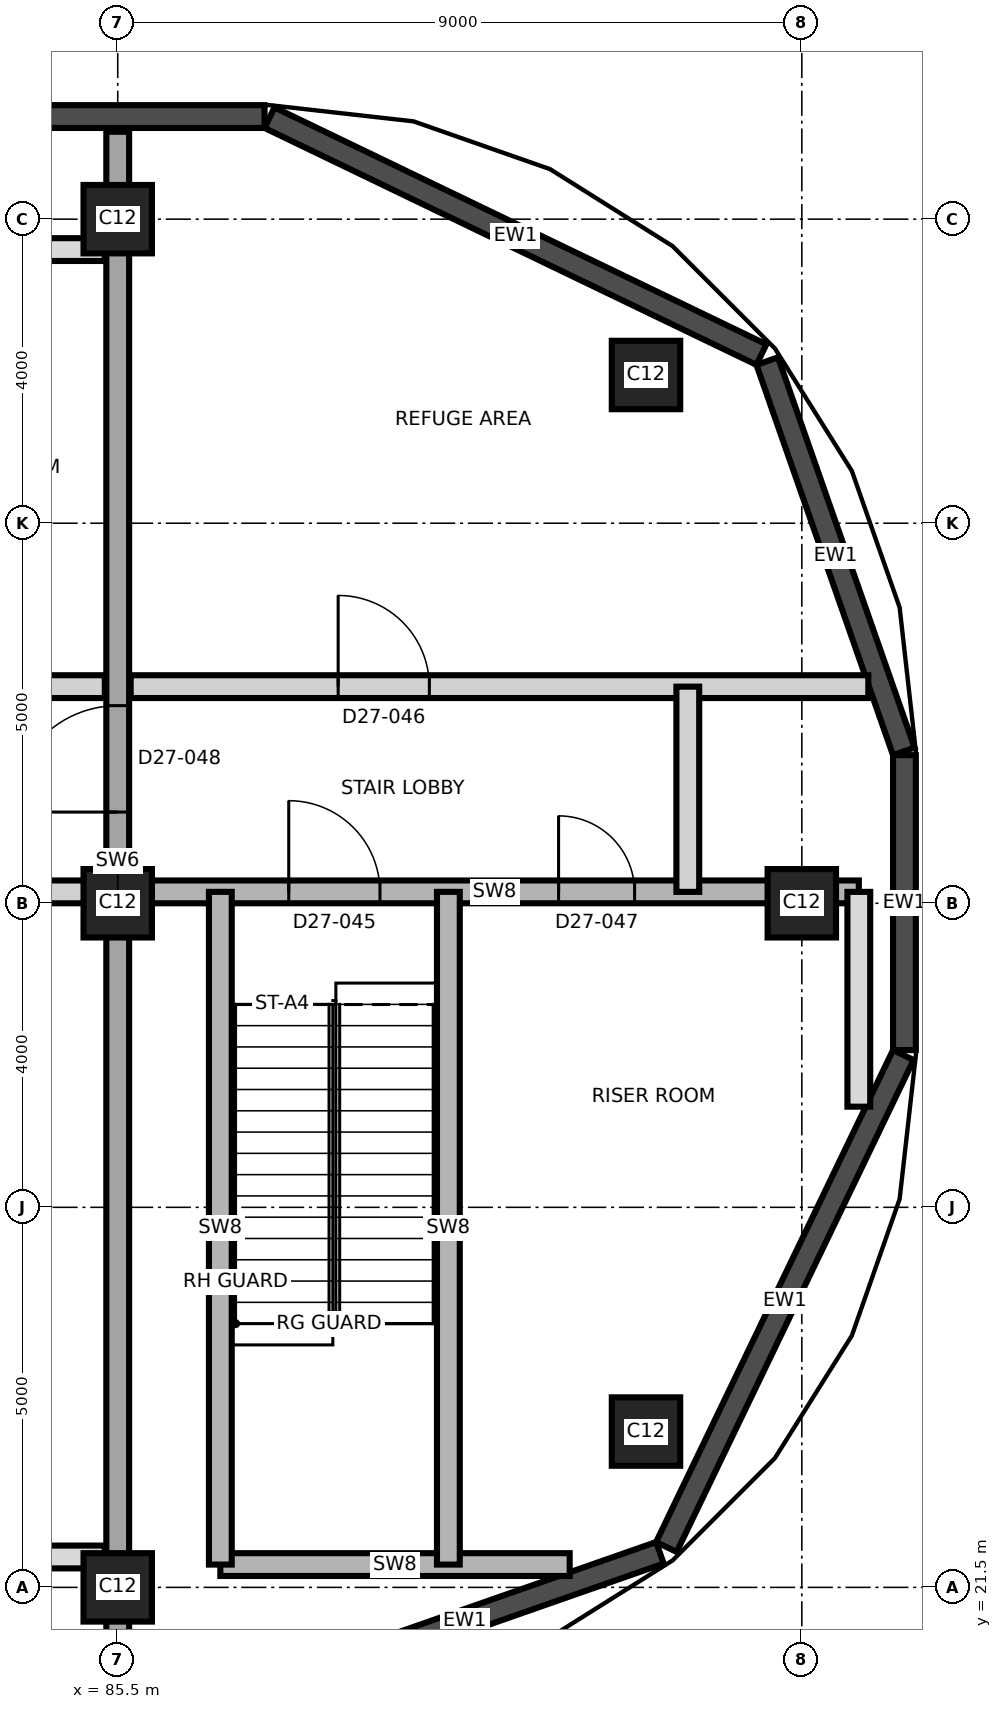
"""IFC4 building model, lengths in metres.
Left out: names, types, materials, properties, quantities, classifications, styles, units other than length and angle.
Written with IfcOpenShell. Run it as: python <this file> out.ifc"""

import sys

from ifc_helpers import new_model, si_unit, direction, frame, frame_2d, origin, origin_2d, place, context, subcontext, project, spatial, rectangle, extrude, element, fill, save


model = new_model("IFC4")
c1 = context("Model", 3, precision=1e-05, world=origin(), true_north=direction((0.0, 1.0)))
c2 = subcontext(c1, "Body", "Model", "MODEL_VIEW")
j1 = project(units=[si_unit("LENGTHUNIT", "METRE"), si_unit("PLANEANGLEUNIT", "RADIAN")], contexts=[c1])
p1 = place(None, origin())
s1 = spatial("IfcSite", under=j1, at=p1, CompositionType="ELEMENT")
p2 = place(p1, origin())
s2 = spatial("IfcBuilding", under=s1, at=p2, CompositionType="ELEMENT")
p3 = place(p2, frame((0.0, 0.0, 243.9)))
s3 = spatial("IfcBuildingStorey", under=s2, at=p3, CompositionType="ELEMENT", Elevation=243.9)
for number, where, z_axis, x_axis in (
    (1, (85.5, 21.5, 0.0), (0.0, 0.0, 1.0), (1.0, 0.0, 0.0)),
    (2, (92.45, 23.55, 0.0), (0.0, 0.0, 1.0), (1.0, 0.0, 0.0)),
    (3, (85.5, 30.5, 0.0), (0.0, 0.0, 1.0), (1.0, 0.0, 0.0)),
    (4, (94.5, 30.5, 0.0), (0.0, 0.0, 1.0), (1.0, 0.0, 0.0)),
    (5, (92.45, 37.45, 0.0), (0.0, 0.0, 1.0), (1.0, 0.0, 0.0)),
    (6, (85.5, 39.5, 0.0), (0.0, 0.0, 1.0), (1.0, 0.0, 0.0)),
):
    element("IfcColumn", number, at=place(p3, frame(where, z_axis=z_axis, x_axis=x_axis)), inside=s3, PredefinedType="COLUMN", context=c2, shape_type="SweptSolid", body=[
        extrude(rectangle(XDim=0.9, YDim=0.9, at=origin_2d()), origin(), (0.0, 0.0, 1.0), 5.5),
    ])
p4 = place(p3, frame((85.5, 20.35, 0.0), z_axis=(0.0, 0.0, 1.0), x_axis=(0.0, 1.0, 0.0)))
e7 = element("IfcWall", 7, at=p4, inside=s3, PredefinedType="SHEAR", context=c2, shape_type="SweptSolid", body=[
    extrude(rectangle(XDim=20.3, YDim=0.3, at=frame_2d((10.15, 0.0))), origin(), (0.0, 0.0, 1.0), 5.5),
])
p5 = place(p4, frame((11.35, 0.0, 0.0)))
e8 = element("IfcOpeningElement", 8, at=p5, cuts=e7, PredefinedType="OPENING", context=c2, shape_type="SweptSolid", body=[
    extrude(rectangle(XDim=1.4, YDim=2.1, at=frame_2d((0.7, 1.05))), frame((0.0, 0.16, 0.0), z_axis=(0.0, -1.0, 0.0), x_axis=(1.0, 0.0, 0.0)), (0.0, 0.0, 1.0), 0.32),
])
p6 = place(p3, frame((87.499, 20.158, 0.0), z_axis=(0.0, 0.0, 1.0), x_axis=(0.943879346284, 0.330290447423, 0.0)))
e9 = element("IfcWall", 9, at=p6, inside=s3, PredefinedType="SOLIDWALL", context=c2, shape_type="SweptSolid", body=[
    extrude(rectangle(XDim=5.439, YDim=0.3, at=frame_2d((2.72, 0.0))), origin(), (0.0, 0.0, 1.0), 5.2),
])
p7 = place(p3, frame((92.719, 22.031, 0.0), z_axis=(0.0, 0.0, 1.0), x_axis=(0.433882040461, 0.90096968593, 0.0)))
e10 = element("IfcWall", 10, at=p7, inside=s3, PredefinedType="SOLIDWALL", context=c2, shape_type="SweptSolid", body=[
    extrude(rectangle(XDim=7.183, YDim=0.3, at=frame_2d((3.592, 0.0))), origin(), (0.0, 0.0, 1.0), 5.2),
])
p8 = place(p3, frame((95.85, 28.568, 0.0), z_axis=(0.0, 0.0, 1.0), x_axis=(0.0, 1.0, 0.0)))
e11 = element("IfcWall", 11, at=p8, inside=s3, PredefinedType="SOLIDWALL", context=c2, shape_type="SweptSolid", body=[
    extrude(rectangle(XDim=3.881, YDim=0.3, at=frame_2d((1.94, 0.0))), origin(), (0.0, 0.0, 1.0), 5.2),
])
p9 = place(p3, frame((95.842, 32.499, 0.0), z_axis=(0.0, 0.0, 1.0), x_axis=(-0.330290447423, 0.943879346284, 0.0)))
e12 = element("IfcWall", 12, at=p9, inside=s3, PredefinedType="SOLIDWALL", context=c2, shape_type="SweptSolid", body=[
    extrude(rectangle(XDim=5.439, YDim=0.3, at=frame_2d((2.72, 0.0))), origin(), (0.0, 0.0, 1.0), 5.2),
])
p10 = place(p3, frame((93.969, 37.719, 0.0), z_axis=(0.0, 0.0, 1.0), x_axis=(-0.90096968593, 0.433882040461, 0.0)))
e13 = element("IfcWall", 13, at=p10, inside=s3, PredefinedType="SOLIDWALL", context=c2, shape_type="SweptSolid", body=[
    extrude(rectangle(XDim=7.183, YDim=0.3, at=frame_2d((3.592, 0.0))), origin(), (0.0, 0.0, 1.0), 5.2),
])
p11 = place(p3, frame((87.432, 40.85, 0.0), z_axis=(0.0, 0.0, 1.0), x_axis=(-1.0, 0.0, 0.0)))
e14 = element("IfcWall", 14, at=p11, inside=s3, PredefinedType="SOLIDWALL", context=c2, shape_type="SweptSolid", body=[
    extrude(rectangle(XDim=31.932, YDim=0.3, at=frame_2d((15.966, 0.0))), origin(), (0.0, 0.0, 1.0), 5.2),
])
p12 = place(p3, frame((86.85, 21.8, 0.0), z_axis=(0.0, 0.0, 1.0), x_axis=(1.0, 0.0, 0.0)))
e15 = element("IfcWall", 15, at=p12, inside=s3, PredefinedType="SHEAR", context=c2, shape_type="SweptSolid", body=[
    extrude(rectangle(XDim=4.596, YDim=0.3, at=frame_2d((2.298, 0.0))), origin(), (0.0, 0.0, 1.0), 5.2),
])
p13 = place(p3, frame((58.55, 21.9, 0.0), z_axis=(0.0, 0.0, 1.0), x_axis=(1.0, 0.0, 0.0)))
e16 = element("IfcWall", 16, at=p13, inside=s3, PredefinedType="PARTITIONING", context=c2, shape_type="SweptSolid", body=[
    extrude(rectangle(XDim=26.78, YDim=0.3, at=frame_2d((13.39, 0.0))), origin(), (0.0, 0.0, 1.0), 5.2),
])
p14 = place(p3, frame((58.55, 30.65, 0.0), z_axis=(0.0, 0.0, 1.0), x_axis=(1.0, 0.0, 0.0)))
e17 = element("IfcWall", 17, at=p14, inside=s3, PredefinedType="PARTITIONING", context=c2, shape_type="SweptSolid", body=[
    extrude(rectangle(XDim=26.78, YDim=0.3, at=frame_2d((13.39, 0.0))), origin(), (0.0, 0.0, 1.0), 5.2),
])
p15 = place(p14, frame((1.6, 0.0, 0.0)))
e18 = element("IfcOpeningElement", 18, at=p15, cuts=e17, PredefinedType="OPENING", context=c2, shape_type="SweptSolid", body=[
    extrude(rectangle(XDim=1.2, YDim=2.1, at=frame_2d((0.6, 1.05))), frame((0.0, 0.16, 0.0), z_axis=(0.0, -1.0, 0.0), x_axis=(1.0, 0.0, 0.0)), (0.0, 0.0, 1.0), 0.32),
])
p16 = place(p14, frame((6.1, 0.0, 0.0)))
e19 = element("IfcOpeningElement", 19, at=p16, cuts=e17, PredefinedType="OPENING", context=c2, shape_type="SweptSolid", body=[
    extrude(rectangle(XDim=1.2, YDim=2.1, at=frame_2d((0.6, 1.05))), frame((0.0, 0.16, 0.0), z_axis=(0.0, -1.0, 0.0), x_axis=(1.0, 0.0, 0.0)), (0.0, 0.0, 1.0), 0.32),
])
p17 = place(p14, frame((10.6, 0.0, 0.0)))
e20 = element("IfcOpeningElement", 20, at=p17, cuts=e17, PredefinedType="OPENING", context=c2, shape_type="SweptSolid", body=[
    extrude(rectangle(XDim=1.2, YDim=2.1, at=frame_2d((0.6, 1.05))), frame((0.0, 0.16, 0.0), z_axis=(0.0, -1.0, 0.0), x_axis=(1.0, 0.0, 0.0)), (0.0, 0.0, 1.0), 0.32),
])
p18 = place(p14, frame((15.1, 0.0, 0.0)))
e21 = element("IfcOpeningElement", 21, at=p18, cuts=e17, PredefinedType="OPENING", context=c2, shape_type="SweptSolid", body=[
    extrude(rectangle(XDim=1.2, YDim=2.1, at=frame_2d((0.6, 1.05))), frame((0.0, 0.16, 0.0), z_axis=(0.0, -1.0, 0.0), x_axis=(1.0, 0.0, 0.0)), (0.0, 0.0, 1.0), 0.32),
])
p19 = place(p14, frame((19.6, 0.0, 0.0)))
e22 = element("IfcOpeningElement", 22, at=p19, cuts=e17, PredefinedType="OPENING", context=c2, shape_type="SweptSolid", body=[
    extrude(rectangle(XDim=1.2, YDim=2.1, at=frame_2d((0.6, 1.05))), frame((0.0, 0.16, 0.0), z_axis=(0.0, -1.0, 0.0), x_axis=(1.0, 0.0, 0.0)), (0.0, 0.0, 1.0), 0.32),
])
p20 = place(p14, frame((24.1, 0.0, 0.0)))
e23 = element("IfcOpeningElement", 23, at=p20, cuts=e17, PredefinedType="OPENING", context=c2, shape_type="SweptSolid", body=[
    extrude(rectangle(XDim=1.2, YDim=2.1, at=frame_2d((0.6, 1.05))), frame((0.0, 0.16, 0.0), z_axis=(0.0, -1.0, 0.0), x_axis=(1.0, 0.0, 0.0)), (0.0, 0.0, 1.0), 0.32),
])
p21 = place(p3, frame((85.67, 30.65, 0.0), z_axis=(0.0, 0.0, 1.0), x_axis=(1.0, 0.0, 0.0)))
e24 = element("IfcWall", 24, at=p21, inside=s3, PredefinedType="SHEAR", context=c2, shape_type="SweptSolid", body=[
    extrude(rectangle(XDim=9.58, YDim=0.3, at=frame_2d((4.79, 0.0))), origin(), (0.0, 0.0, 1.0), 5.2),
])
p22 = place(p21, frame((2.08, 0.0, 0.0)))
e25 = element("IfcOpeningElement", 25, at=p22, cuts=e24, PredefinedType="OPENING", context=c2, shape_type="SweptSolid", body=[
    extrude(rectangle(XDim=1.2, YDim=2.1, at=frame_2d((0.6, 1.05))), frame((0.0, 0.16, 0.0), z_axis=(0.0, -1.0, 0.0), x_axis=(1.0, 0.0, 0.0)), (0.0, 0.0, 1.0), 0.32),
])
p23 = place(p21, frame((5.63, 0.0, 0.0)))
e26 = element("IfcOpeningElement", 26, at=p23, cuts=e24, PredefinedType="OPENING", context=c2, shape_type="SweptSolid", body=[
    extrude(rectangle(XDim=1.0, YDim=2.1, at=frame_2d((0.5, 1.05))), frame((0.0, 0.16, 0.0), z_axis=(0.0, -1.0, 0.0), x_axis=(1.0, 0.0, 0.0)), (0.0, 0.0, 1.0), 0.32),
])
p24 = place(p3, frame((58.55, 33.35, 0.0), z_axis=(0.0, 0.0, 1.0), x_axis=(1.0, 0.0, 0.0)))
e27 = element("IfcWall", 27, at=p24, inside=s3, PredefinedType="PARTITIONING", context=c2, shape_type="SweptSolid", body=[
    extrude(rectangle(XDim=26.78, YDim=0.3, at=frame_2d((13.39, 0.0))), origin(), (0.0, 0.0, 1.0), 5.2),
])
p25 = place(p24, frame((1.6, 0.0, 0.0)))
e28 = element("IfcOpeningElement", 28, at=p25, cuts=e27, PredefinedType="OPENING", context=c2, shape_type="SweptSolid", body=[
    extrude(rectangle(XDim=1.2, YDim=2.1, at=frame_2d((0.6, 1.05))), frame((0.0, 0.16, 0.0), z_axis=(0.0, -1.0, 0.0), x_axis=(1.0, 0.0, 0.0)), (0.0, 0.0, 1.0), 0.32),
])
p26 = place(p24, frame((6.1, 0.0, 0.0)))
e29 = element("IfcOpeningElement", 29, at=p26, cuts=e27, PredefinedType="OPENING", context=c2, shape_type="SweptSolid", body=[
    extrude(rectangle(XDim=1.2, YDim=2.1, at=frame_2d((0.6, 1.05))), frame((0.0, 0.16, 0.0), z_axis=(0.0, -1.0, 0.0), x_axis=(1.0, 0.0, 0.0)), (0.0, 0.0, 1.0), 0.32),
])
p27 = place(p24, frame((10.6, 0.0, 0.0)))
e30 = element("IfcOpeningElement", 30, at=p27, cuts=e27, PredefinedType="OPENING", context=c2, shape_type="SweptSolid", body=[
    extrude(rectangle(XDim=1.2, YDim=2.1, at=frame_2d((0.6, 1.05))), frame((0.0, 0.16, 0.0), z_axis=(0.0, -1.0, 0.0), x_axis=(1.0, 0.0, 0.0)), (0.0, 0.0, 1.0), 0.32),
])
p28 = place(p24, frame((15.1, 0.0, 0.0)))
e31 = element("IfcOpeningElement", 31, at=p28, cuts=e27, PredefinedType="OPENING", context=c2, shape_type="SweptSolid", body=[
    extrude(rectangle(XDim=1.2, YDim=2.1, at=frame_2d((0.6, 1.05))), frame((0.0, 0.16, 0.0), z_axis=(0.0, -1.0, 0.0), x_axis=(1.0, 0.0, 0.0)), (0.0, 0.0, 1.0), 0.32),
])
p29 = place(p24, frame((19.6, 0.0, 0.0)))
e32 = element("IfcOpeningElement", 32, at=p29, cuts=e27, PredefinedType="OPENING", context=c2, shape_type="SweptSolid", body=[
    extrude(rectangle(XDim=1.2, YDim=2.1, at=frame_2d((0.6, 1.05))), frame((0.0, 0.16, 0.0), z_axis=(0.0, -1.0, 0.0), x_axis=(1.0, 0.0, 0.0)), (0.0, 0.0, 1.0), 0.32),
])
p30 = place(p24, frame((24.1, 0.0, 0.0)))
e33 = element("IfcOpeningElement", 33, at=p30, cuts=e27, PredefinedType="OPENING", context=c2, shape_type="SweptSolid", body=[
    extrude(rectangle(XDim=1.2, YDim=2.1, at=frame_2d((0.6, 1.05))), frame((0.0, 0.16, 0.0), z_axis=(0.0, -1.0, 0.0), x_axis=(1.0, 0.0, 0.0)), (0.0, 0.0, 1.0), 0.32),
])
p31 = place(p3, frame((85.67, 33.35, 0.0), z_axis=(0.0, 0.0, 1.0), x_axis=(1.0, 0.0, 0.0)))
e34 = element("IfcWall", 34, at=p31, inside=s3, PredefinedType="PARTITIONING", context=c2, shape_type="SweptSolid", body=[
    extrude(rectangle(XDim=9.705, YDim=0.3, at=frame_2d((4.853, 0.0))), origin(), (0.0, 0.0, 1.0), 5.2),
])
p32 = place(p31, frame((2.73, 0.0, 0.0)))
e35 = element("IfcOpeningElement", 35, at=p32, cuts=e34, PredefinedType="OPENING", context=c2, shape_type="SweptSolid", body=[
    extrude(rectangle(XDim=1.2, YDim=2.1, at=frame_2d((0.6, 1.05))), frame((0.0, 0.16, 0.0), z_axis=(0.0, -1.0, 0.0), x_axis=(1.0, 0.0, 0.0)), (0.0, 0.0, 1.0), 0.32),
])
p33 = place(p3, frame((58.55, 39.1, 0.0), z_axis=(0.0, 0.0, 1.0), x_axis=(1.0, 0.0, 0.0)))
e36 = element("IfcWall", 36, at=p33, inside=s3, PredefinedType="PARTITIONING", context=c2, shape_type="SweptSolid", body=[
    extrude(rectangle(XDim=26.78, YDim=0.3, at=frame_2d((13.39, 0.0))), origin(), (0.0, 0.0, 1.0), 5.2),
])
for number, where, z_axis, x_axis in (
    (37, (86.85, 21.8, 0.0), (0.0, 0.0, 1.0), (0.0, 1.0, 0.0)),
    (38, (89.85, 21.8, 0.0), (0.0, 0.0, 1.0), (0.0, 1.0, 0.0)),
):
    element("IfcWall", number, at=place(p3, frame(where, z_axis=z_axis, x_axis=x_axis)), inside=s3, PredefinedType="SHEAR", context=c2, shape_type="SweptSolid", body=[
        extrude(rectangle(XDim=8.85, YDim=0.3, at=frame_2d((4.425, 0.0))), origin(), (0.0, 0.0, 1.0), 5.2),
    ])
p34 = place(p3, frame((93.0, 30.65, 0.0), z_axis=(0.0, 0.0, 1.0), x_axis=(0.0, 1.0, 0.0)))
e39 = element("IfcWall", 39, at=p34, inside=s3, PredefinedType="PARTITIONING", context=c2, shape_type="SweptSolid", body=[
    extrude(rectangle(XDim=2.7, YDim=0.3, at=frame_2d((1.35, 0.0))), origin(), (0.0, 0.0, 1.0), 5.2),
])
p35 = place(p3, frame((95.25, 27.824, 0.0), z_axis=(0.0, 0.0, 1.0), x_axis=(0.0, 1.0, 0.0)))
e40 = element("IfcWall", 40, at=p35, inside=s3, PredefinedType="PARTITIONING", context=c2, shape_type="SweptSolid", body=[
    extrude(rectangle(XDim=2.826, YDim=0.3, at=frame_2d((1.413, 0.0))), origin(), (0.0, 0.0, 1.0), 5.2),
])
p36 = place(p22, origin())
e41 = element("IfcDoor", 41, at=p36, inside=s3, OperationType="SINGLE_SWING_LEFT", PredefinedType="DOOR", context=c2, shape_type="SweptSolid", body=[
    extrude(rectangle(XDim=1.2, YDim=2.1, at=frame_2d((0.6, 1.05))), frame((0.0, 0.025, 0.0), z_axis=(0.0, -1.0, 0.0), x_axis=(1.0, 0.0, 0.0)), (0.0, 0.0, 1.0), 0.05),
])
fill(e25, e41)
p37 = place(p32, origin())
e42 = element("IfcDoor", 42, at=p37, inside=s3, OperationType="SINGLE_SWING_LEFT", PredefinedType="DOOR", context=c2, shape_type="SweptSolid", body=[
    extrude(rectangle(XDim=1.2, YDim=2.1, at=frame_2d((0.6, 1.05))), frame((0.0, 0.025, 0.0), z_axis=(0.0, -1.0, 0.0), x_axis=(1.0, 0.0, 0.0)), (0.0, 0.0, 1.0), 0.05),
])
fill(e35, e42)
p38 = place(p23, origin())
e43 = element("IfcDoor", 43, at=p38, inside=s3, OperationType="SINGLE_SWING_LEFT", PredefinedType="DOOR", context=c2, shape_type="SweptSolid", body=[
    extrude(rectangle(XDim=1.0, YDim=2.1, at=frame_2d((0.5, 1.05))), frame((0.0, 0.025, 0.0), z_axis=(0.0, -1.0, 0.0), x_axis=(1.0, 0.0, 0.0)), (0.0, 0.0, 1.0), 0.05),
])
fill(e26, e43)
p39 = place(p5, origin())
e44 = element("IfcDoor", 44, at=p39, inside=s3, OperationType="SINGLE_SWING_RIGHT", PredefinedType="DOOR", context=c2, shape_type="SweptSolid", body=[
    extrude(rectangle(XDim=1.4, YDim=2.1, at=frame_2d((0.7, 1.05))), frame((0.0, 0.025, 0.0), z_axis=(0.0, -1.0, 0.0), x_axis=(1.0, 0.0, 0.0)), (0.0, 0.0, 1.0), 0.05),
])
fill(e8, e44)
save(model, sys.argv[1])
